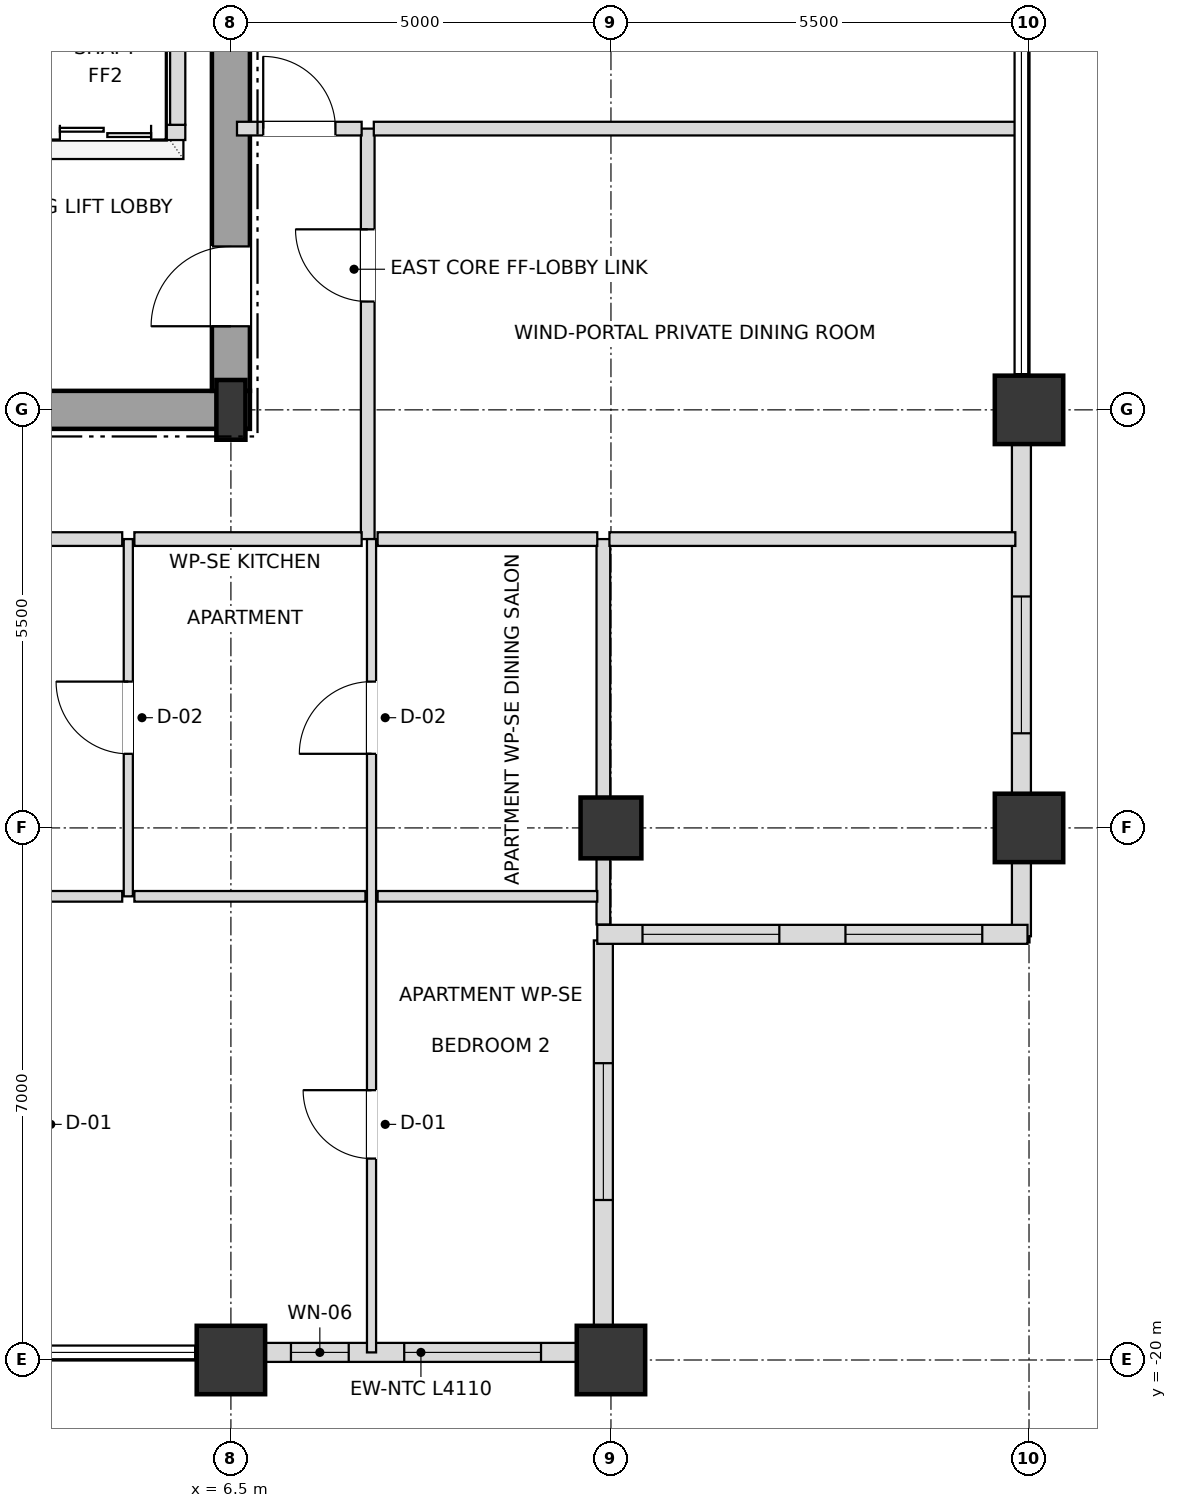
"""IFC4 building model, lengths in metres.
Left out: names, types, materials, properties, quantities, classifications, styles, units other than length and angle.
Written with IfcOpenShell. Run it as: python <this file> out.ifc"""

import sys

from ifc_helpers import new_model, si_unit, direction, frame, frame_2d, origin, origin_2d, place, context, subcontext, project, spatial, rectangle, i_section, extrude, element, fill, save


model = new_model("IFC4")
c1 = context("Model", 3, precision=1e-05, world=origin(), true_north=direction((0.0, 1.0)))
c2 = subcontext(c1, "Body", "Model", "MODEL_VIEW")
j1 = project(units=[si_unit("LENGTHUNIT", "METRE"), si_unit("PLANEANGLEUNIT", "RADIAN")], contexts=[c1])
p1 = place(None, origin())
s1 = spatial("IfcSite", under=j1, at=p1, CompositionType="ELEMENT")
p2 = place(p1, origin())
s2 = spatial("IfcBuilding", under=s1, at=p2, CompositionType="ELEMENT")
p3 = place(p2, frame((0.0, 0.0, 265.5)))
s3 = spatial("IfcBuildingStorey", under=s2, at=p3, CompositionType="ELEMENT", Elevation=265.5)
p4 = place(p3, frame((6.5, -7.5, 0.0), z_axis=(0.0, 0.0, 1.0), x_axis=(1.0, 0.0, 0.0)))
e1 = element("IfcColumn", 1, at=p4, inside=s3, PredefinedType="COLUMN", context=c2, shape_type="SweptSolid", body=[
    extrude(i_section(OverallWidth=0.382, OverallDepth=0.786, WebThickness=0.02, FlangeThickness=0.033, at=origin_2d()), origin(), (0.0, 0.0, 1.0), 3.6),
])
for number, where, z_axis, x_axis in (
    (2, (6.5, -20.0, 0.0), (0.0, 0.0, 1.0), (1.0, 0.0, 0.0)),
    (3, (11.5, -20.0, 0.0), (0.0, 0.0, 1.0), (1.0, 0.0, 0.0)),
    (4, (17.0, -13.0, 0.0), (0.0, 0.0, 1.0), (1.0, 0.0, 0.0)),
    (5, (17.0, -7.5, 0.0), (0.0, 0.0, 1.0), (1.0, 0.0, 0.0)),
):
    element("IfcColumn", number, at=place(p3, frame(where, z_axis=z_axis, x_axis=x_axis)), inside=s3, PredefinedType="USERDEFINED", context=c2, shape_type="SweptSolid", body=[
        extrude(rectangle(XDim=0.9, YDim=0.9, at=origin_2d()), origin(), (0.0, 0.0, 1.0), 3.6),
    ])
p5 = place(p3, frame((11.5, -13.0, 0.0), z_axis=(0.0, 0.0, 1.0), x_axis=(1.0, 0.0, 0.0)))
e6 = element("IfcColumn", 6, at=p5, inside=s3, PredefinedType="COLUMN", context=c2, shape_type="SweptSolid", body=[
    extrude(rectangle(XDim=0.8, YDim=0.8, at=origin_2d()), origin(), (0.0, 0.0, 1.0), 3.6),
])
p6 = place(p3, frame((6.945, -19.9, 0.0), z_axis=(0.0, 0.0, 1.0), x_axis=(1.0, 0.0, 0.0)))
e7 = element("IfcWall", 7, at=p6, inside=s3, PredefinedType="SOLIDWALL", context=c2, shape_type="SweptSolid", body=[
    extrude(rectangle(XDim=4.11, YDim=0.25, at=frame_2d((2.055, 0.0))), origin(), (0.0, 0.0, 1.0), 2.748),
])
p7 = place(p6, frame((0.345, 0.0, 0.72)))
e8 = element("IfcOpeningElement", 8, at=p7, cuts=e7, PredefinedType="OPENING", context=c2, shape_type="SweptSolid", body=[
    extrude(rectangle(XDim=0.76, YDim=1.68, at=frame_2d((0.38, 0.84))), frame((0.0, 0.135, 0.0), z_axis=(0.0, -1.0, 0.0), x_axis=(1.0, 0.0, 0.0)), (0.0, 0.0, 1.0), 0.27),
])
p8 = place(p6, frame((1.835, 0.0, 0.72)))
e9 = element("IfcOpeningElement", 9, at=p8, cuts=e7, PredefinedType="OPENING", context=c2, shape_type="SweptSolid", body=[
    extrude(rectangle(XDim=1.8, YDim=1.68, at=frame_2d((0.9, 0.84))), frame((0.0, 0.135, 0.0), z_axis=(0.0, -1.0, 0.0), x_axis=(1.0, 0.0, 0.0)), (0.0, 0.0, 1.0), 0.27),
])
p9 = place(p3, frame((16.9, -14.425, 0.0), z_axis=(0.0, 0.0, 1.0), x_axis=(0.0, 1.0, 0.0)))
e10 = element("IfcWall", 10, at=p9, inside=s3, PredefinedType="SOLIDWALL", context=c2, shape_type="SweptSolid", body=[
    extrude(rectangle(XDim=0.98, YDim=0.25, at=frame_2d((0.49, 0.0))), origin(), (0.0, 0.0, 1.0), 2.748),
])
p10 = place(p3, frame((16.9, -12.555, 0.0), z_axis=(0.0, 0.0, 1.0), x_axis=(0.0, 1.0, 0.0)))
e11 = element("IfcWall", 11, at=p10, inside=s3, PredefinedType="SOLIDWALL", context=c2, shape_type="SweptSolid", body=[
    extrude(rectangle(XDim=4.61, YDim=0.25, at=frame_2d((2.305, 0.0))), origin(), (0.0, 0.0, 1.0), 2.748),
])
p11 = place(p10, frame((0.8, 0.0, 0.72)))
e12 = element("IfcOpeningElement", 12, at=p11, cuts=e11, PredefinedType="OPENING", context=c2, shape_type="SweptSolid", body=[
    extrude(rectangle(XDim=1.8, YDim=1.68, at=frame_2d((0.9, 0.84))), frame((0.0, 0.135, 0.0), z_axis=(0.0, -1.0, 0.0), x_axis=(1.0, 0.0, 0.0)), (0.0, 0.0, 1.0), 0.27),
])
p12 = place(p3, frame((11.4, -19.82, 0.0), z_axis=(0.0, 0.0, 1.0), x_axis=(0.0, 1.0, 0.0)))
e13 = element("IfcWall", 13, at=p12, inside=s3, PredefinedType="SOLIDWALL", context=c2, shape_type="SweptSolid", body=[
    extrude(rectangle(XDim=5.34, YDim=0.25, at=frame_2d((2.67, 0.0))), origin(), (0.0, 0.0, 1.0), 2.748),
])
p13 = place(p12, frame((1.925, 0.0, 0.72)))
e14 = element("IfcOpeningElement", 14, at=p13, cuts=e13, PredefinedType="OPENING", context=c2, shape_type="SweptSolid", body=[
    extrude(rectangle(XDim=1.8, YDim=1.68, at=frame_2d((0.9, 0.84))), frame((0.0, 0.135, 0.0), z_axis=(0.0, -1.0, 0.0), x_axis=(1.0, 0.0, 0.0)), (0.0, 0.0, 1.0), 0.27),
])
p14 = place(p3, frame((11.32, -14.4, 0.0), z_axis=(0.0, 0.0, 1.0), x_axis=(1.0, 0.0, 0.0)))
e15 = element("IfcWall", 15, at=p14, inside=s3, PredefinedType="SOLIDWALL", context=c2, shape_type="SweptSolid", body=[
    extrude(rectangle(XDim=5.66, YDim=0.25, at=frame_2d((2.83, 0.0))), origin(), (0.0, 0.0, 1.0), 2.748),
])
p15 = place(p14, frame((0.595, 0.0, 0.72)))
e16 = element("IfcOpeningElement", 16, at=p15, cuts=e15, PredefinedType="OPENING", context=c2, shape_type="SweptSolid", body=[
    extrude(rectangle(XDim=1.8, YDim=1.68, at=frame_2d((0.9, 0.84))), frame((0.0, 0.135, 0.0), z_axis=(0.0, -1.0, 0.0), x_axis=(1.0, 0.0, 0.0)), (0.0, 0.0, 1.0), 0.27),
])
p16 = place(p14, frame((3.265, 0.0, 0.72)))
e17 = element("IfcOpeningElement", 17, at=p16, cuts=e15, PredefinedType="OPENING", context=c2, shape_type="SweptSolid", body=[
    extrude(rectangle(XDim=1.8, YDim=1.68, at=frame_2d((0.9, 0.84))), frame((0.0, 0.135, 0.0), z_axis=(0.0, -1.0, 0.0), x_axis=(1.0, 0.0, 0.0)), (0.0, 0.0, 1.0), 0.27),
])
p17 = place(p3, frame((0.0, -7.5, 0.0), z_axis=(0.0, 0.0, 1.0), x_axis=(1.0, 0.0, 0.0)))
e18 = element("IfcWall", 18, at=p17, inside=s3, PredefinedType="SHEAR", context=c2, shape_type="SweptSolid", body=[
    extrude(rectangle(XDim=6.75, YDim=0.5, at=frame_2d((3.375, 0.0))), origin(), (0.0, 0.0, 1.0), 3.38),
])
p18 = place(p3, frame((6.5, -7.25, 0.0), z_axis=(0.0, 0.0, 1.0), x_axis=(0.0, 1.0, 0.0)))
e19 = element("IfcWall", 19, at=p18, inside=s3, PredefinedType="SHEAR", context=c2, shape_type="SweptSolid", body=[
    extrude(rectangle(XDim=5.75, YDim=0.5, at=frame_2d((2.875, 0.0))), origin(), (0.0, 0.0, 1.0), 3.38),
])
p19 = place(p18, frame((0.85, 0.0, 0.0)))
e20 = element("IfcOpeningElement", 20, at=p19, cuts=e19, PredefinedType="OPENING", context=c2, shape_type="SweptSolid", body=[
    extrude(rectangle(XDim=1.05, YDim=2.15, at=frame_2d((0.525, 1.075))), frame((0.0, 0.26, 0.0), z_axis=(0.0, -1.0, 0.0), x_axis=(1.0, 0.0, 0.0)), (0.0, 0.0, 1.0), 0.52),
])
p20 = place(p3, frame((1.8, -3.85, 0.0), z_axis=(0.0, 0.0, 1.0), x_axis=(1.0, 0.0, 0.0)))
e21 = element("IfcWall", 21, at=p20, inside=s3, PredefinedType="SOLIDWALL", context=c2, shape_type="SweptSolid", body=[
    extrude(rectangle(XDim=4.1, YDim=0.2, at=frame_2d((2.05, 0.0))), origin(), (0.0, 0.0, 1.0), 3.38),
])
p21 = place(p20, frame((0.45, 0.0, 0.0)))
e22 = element("IfcOpeningElement", 22, at=p21, cuts=e21, PredefinedType="OPENING", context=c2, shape_type="SweptSolid", body=[
    extrude(rectangle(XDim=1.2, YDim=2.2, at=frame_2d((0.6, 1.1))), frame((0.0, 0.11, 0.0), z_axis=(0.0, -1.0, 0.0), x_axis=(1.0, 0.0, 0.0)), (0.0, 0.0, 1.0), 0.22),
])
p22 = place(p20, frame((2.45, 0.0, 0.0)))
e23 = element("IfcOpeningElement", 23, at=p22, cuts=e21, PredefinedType="OPENING", context=c2, shape_type="SweptSolid", body=[
    extrude(rectangle(XDim=1.2, YDim=2.2, at=frame_2d((0.6, 1.1))), frame((0.0, 0.11, 0.0), z_axis=(0.0, -1.0, 0.0), x_axis=(1.0, 0.0, 0.0)), (0.0, 0.0, 1.0), 0.22),
])
p23 = place(p3, frame((5.8, -3.75, 0.0), z_axis=(0.0, 0.0, 1.0), x_axis=(0.0, 1.0, 0.0)))
e24 = element("IfcWall", 24, at=p23, inside=s3, PredefinedType="SOLIDWALL", context=c2, shape_type="SweptSolid", body=[
    extrude(rectangle(XDim=2.0, YDim=0.2, at=frame_2d((1.0, 0.0))), origin(), (0.0, 0.0, 1.0), 3.38),
])
p24 = place(p3, frame((5.15, -13.9, 0.0), z_axis=(0.0, 0.0, 1.0), x_axis=(0.0, 1.0, 0.0)))
e25 = element("IfcWall", 25, at=p24, inside=s3, PredefinedType="PARTITIONING", context=c2, shape_type="SweptSolid", body=[
    extrude(rectangle(XDim=4.7, YDim=0.12, at=frame_2d((2.35, 0.0))), origin(), (0.0, 0.0, 1.0), 3.38),
])
p25 = place(p24, frame((1.875, 0.0, 0.0)))
e26 = element("IfcOpeningElement", 26, at=p25, cuts=e25, PredefinedType="OPENING", context=c2, shape_type="SweptSolid", body=[
    extrude(rectangle(XDim=0.95, YDim=2.1, at=frame_2d((0.475, 1.05))), frame((0.0, 0.07, 0.0), z_axis=(0.0, -1.0, 0.0), x_axis=(1.0, 0.0, 0.0)), (0.0, 0.0, 1.0), 0.14),
])
p26 = place(p3, frame((8.3, -9.2, 0.0), z_axis=(0.0, 0.0, 1.0), x_axis=(0.0, 1.0, 0.0)))
e27 = element("IfcWall", 27, at=p26, inside=s3, PredefinedType="PARTITIONING", context=c2, shape_type="SweptSolid", body=[
    extrude(rectangle(XDim=5.4, YDim=0.18, at=frame_2d((2.7, 0.0))), origin(), (0.0, 0.0, 1.0), 2.826),
])
p27 = place(p26, frame((3.125, 0.0, 0.0)))
e28 = element("IfcOpeningElement", 28, at=p27, cuts=e27, PredefinedType="OPENING", context=c2, shape_type="SweptSolid", body=[
    extrude(rectangle(XDim=0.95, YDim=2.15, at=frame_2d((0.475, 1.075))), frame((0.0, 0.1, 0.0), z_axis=(0.0, -1.0, 0.0), x_axis=(1.0, 0.0, 0.0)), (0.0, 0.0, 1.0), 0.2),
])
p28 = place(p3, frame((8.35, -19.9, 0.0), z_axis=(0.0, 0.0, 1.0), x_axis=(0.0, 1.0, 0.0)))
e29 = element("IfcWall", 29, at=p28, inside=s3, PredefinedType="PARTITIONING", context=c2, shape_type="SweptSolid", body=[
    extrude(rectangle(XDim=10.7, YDim=0.12, at=frame_2d((5.35, 0.0))), origin(), (0.0, 0.0, 1.0), 2.826),
])
p29 = place(p28, frame((7.875, 0.0, 0.0)))
e30 = element("IfcOpeningElement", 30, at=p29, cuts=e29, PredefinedType="OPENING", context=c2, shape_type="SweptSolid", body=[
    extrude(rectangle(XDim=0.95, YDim=2.1, at=frame_2d((0.475, 1.05))), frame((0.0, 0.07, 0.0), z_axis=(0.0, -1.0, 0.0), x_axis=(1.0, 0.0, 0.0)), (0.0, 0.0, 1.0), 0.14),
])
p30 = place(p28, frame((2.55, 0.0, 0.0)))
e31 = element("IfcOpeningElement", 31, at=p30, cuts=e29, PredefinedType="OPENING", context=c2, shape_type="SweptSolid", body=[
    extrude(rectangle(XDim=0.9, YDim=2.1, at=frame_2d((0.45, 1.05))), frame((0.0, 0.07, 0.0), z_axis=(0.0, -1.0, 0.0), x_axis=(1.0, 0.0, 0.0)), (0.0, 0.0, 1.0), 0.14),
])
p31 = place(p3, frame((11.4, -14.27, 0.0), z_axis=(0.0, 0.0, 1.0), x_axis=(0.0, 1.0, 0.0)))
e32 = element("IfcWall", 32, at=p31, inside=s3, PredefinedType="PARTITIONING", context=c2, shape_type="SweptSolid", body=[
    extrude(rectangle(XDim=5.07, YDim=0.18, at=frame_2d((2.535, 0.0))), origin(), (0.0, 0.0, 1.0), 2.748),
])
p32 = place(p3, frame((4.03, -13.9, 0.0), z_axis=(0.0, 0.0, 1.0), x_axis=(1.0, 0.0, 0.0)))
e33 = element("IfcWall", 33, at=p32, inside=s3, PredefinedType="PARTITIONING", context=c2, shape_type="SweptSolid", body=[
    extrude(rectangle(XDim=1.04, YDim=0.14, at=frame_2d((0.52, 0.0))), origin(), (0.0, 0.0, 1.0), 3.38),
])
p33 = place(p3, frame((5.23, -13.9, 0.0), z_axis=(0.0, 0.0, 1.0), x_axis=(1.0, 0.0, 0.0)))
e34 = element("IfcWall", 34, at=p33, inside=s3, PredefinedType="PARTITIONING", context=c2, shape_type="SweptSolid", body=[
    extrude(rectangle(XDim=3.04, YDim=0.14, at=frame_2d((1.52, 0.0))), origin(), (0.0, 0.0, 1.0), 2.826),
])
p34 = place(p3, frame((8.43, -13.9, 0.0), z_axis=(0.0, 0.0, 1.0), x_axis=(1.0, 0.0, 0.0)))
e35 = element("IfcWall", 35, at=p34, inside=s3, PredefinedType="PARTITIONING", context=c2, shape_type="SweptSolid", body=[
    extrude(rectangle(XDim=2.89, YDim=0.14, at=frame_2d((1.445, 0.0))), origin(), (0.0, 0.0, 1.0), 3.38),
])
p35 = place(p3, frame((1.03, -9.2, 0.0), z_axis=(0.0, 0.0, 1.0), x_axis=(1.0, 0.0, 0.0)))
e36 = element("IfcWall", 36, at=p35, inside=s3, PredefinedType="PARTITIONING", context=c2, shape_type="SweptSolid", body=[
    extrude(rectangle(XDim=4.04, YDim=0.18, at=frame_2d((2.02, 0.0))), origin(), (0.0, 0.0, 1.0), 3.38),
])
p36 = place(p35, frame((1.545, 0.0, 0.0)))
e37 = element("IfcOpeningElement", 37, at=p36, cuts=e36, PredefinedType="OPENING", context=c2, shape_type="SweptSolid", body=[
    extrude(rectangle(XDim=0.95, YDim=2.15, at=frame_2d((0.475, 1.075))), frame((0.0, 0.1, 0.0), z_axis=(0.0, -1.0, 0.0), x_axis=(1.0, 0.0, 0.0)), (0.0, 0.0, 1.0), 0.2),
])
p37 = place(p3, frame((5.23, -9.2, 0.0), z_axis=(0.0, 0.0, 1.0), x_axis=(1.0, 0.0, 0.0)))
e38 = element("IfcWall", 38, at=p37, inside=s3, PredefinedType="PARTITIONING", context=c2, shape_type="SweptSolid", body=[
    extrude(rectangle(XDim=2.99, YDim=0.18, at=frame_2d((1.495, 0.0))), origin(), (0.0, 0.0, 1.0), 2.826),
])
p38 = place(p3, frame((8.43, -9.2, 0.0), z_axis=(0.0, 0.0, 1.0), x_axis=(1.0, 0.0, 0.0)))
e39 = element("IfcWall", 39, at=p38, inside=s3, PredefinedType="PARTITIONING", context=c2, shape_type="SweptSolid", body=[
    extrude(rectangle(XDim=2.89, YDim=0.18, at=frame_2d((1.445, 0.0))), origin(), (0.0, 0.0, 1.0), 3.38),
])
p39 = place(p3, frame((11.48, -9.2, 0.0), z_axis=(0.0, 0.0, 1.0), x_axis=(1.0, 0.0, 0.0)))
e40 = element("IfcWall", 40, at=p39, inside=s3, PredefinedType="PARTITIONING", context=c2, shape_type="SweptSolid", body=[
    extrude(rectangle(XDim=5.34, YDim=0.18, at=frame_2d((2.67, 0.0))), origin(), (0.0, 0.0, 1.0), 3.38),
])
p40 = place(p3, frame((6.58, -3.8, 0.0), z_axis=(0.0, 0.0, 1.0), x_axis=(1.0, 0.0, 0.0)))
e41 = element("IfcWall", 41, at=p40, inside=s3, PredefinedType="PARTITIONING", context=c2, shape_type="SweptSolid", body=[
    extrude(rectangle(XDim=1.64, YDim=0.18, at=frame_2d((0.82, 0.0))), origin(), (0.0, 0.0, 1.0), 3.38),
])
p41 = place(p40, frame((0.345, 0.0, 0.0)))
e42 = element("IfcOpeningElement", 42, at=p41, cuts=e41, PredefinedType="OPENING", context=c2, shape_type="SweptSolid", body=[
    extrude(rectangle(XDim=0.95, YDim=2.15, at=frame_2d((0.475, 1.075))), frame((0.0, 0.1, 0.0), z_axis=(0.0, -1.0, 0.0), x_axis=(1.0, 0.0, 0.0)), (0.0, 0.0, 1.0), 0.2),
])
p42 = place(p3, frame((8.38, -3.8, 0.0), z_axis=(0.0, 0.0, 1.0), x_axis=(1.0, 0.0, 0.0)))
e43 = element("IfcWall", 43, at=p42, inside=s3, PredefinedType="PARTITIONING", context=c2, shape_type="SweptSolid", body=[
    extrude(rectangle(XDim=8.44, YDim=0.18, at=frame_2d((4.22, 0.0))), origin(), (0.0, 0.0, 1.0), 3.018),
])
p43 = place(p7, origin())
e44 = element("IfcWindow", 44, at=p43, inside=s3, PartitioningType="SINGLE_PANEL", PredefinedType="WINDOW", context=c2, shape_type="SweptSolid", body=[
    extrude(rectangle(XDim=0.76, YDim=1.68, at=frame_2d((0.38, 0.84))), frame((0.0, 0.03, 0.0), z_axis=(0.0, -1.0, 0.0), x_axis=(1.0, 0.0, 0.0)), (0.0, 0.0, 1.0), 0.06),
])
fill(e8, e44)
p44 = place(p8, origin())
e45 = element("IfcWindow", 45, at=p44, inside=s3, PartitioningType="SINGLE_PANEL", PredefinedType="WINDOW", context=c2, shape_type="SweptSolid", body=[
    extrude(rectangle(XDim=1.8, YDim=1.68, at=frame_2d((0.9, 0.84))), frame((0.0, 0.03, 0.0), z_axis=(0.0, -1.0, 0.0), x_axis=(1.0, 0.0, 0.0)), (0.0, 0.0, 1.0), 0.06),
])
fill(e9, e45)
p45 = place(p11, origin())
e46 = element("IfcWindow", 46, at=p45, inside=s3, PartitioningType="SINGLE_PANEL", PredefinedType="WINDOW", context=c2, shape_type="SweptSolid", body=[
    extrude(rectangle(XDim=1.8, YDim=1.68, at=frame_2d((0.9, 0.84))), frame((0.0, 0.03, 0.0), z_axis=(0.0, -1.0, 0.0), x_axis=(1.0, 0.0, 0.0)), (0.0, 0.0, 1.0), 0.06),
])
fill(e12, e46)
p46 = place(p13, origin())
e47 = element("IfcWindow", 47, at=p46, inside=s3, PartitioningType="SINGLE_PANEL", PredefinedType="WINDOW", context=c2, shape_type="SweptSolid", body=[
    extrude(rectangle(XDim=1.8, YDim=1.68, at=frame_2d((0.9, 0.84))), frame((0.0, 0.03, 0.0), z_axis=(0.0, -1.0, 0.0), x_axis=(1.0, 0.0, 0.0)), (0.0, 0.0, 1.0), 0.06),
])
fill(e14, e47)
p47 = place(p15, origin())
e48 = element("IfcWindow", 48, at=p47, inside=s3, PartitioningType="SINGLE_PANEL", PredefinedType="WINDOW", context=c2, shape_type="SweptSolid", body=[
    extrude(rectangle(XDim=1.8, YDim=1.68, at=frame_2d((0.9, 0.84))), frame((0.0, 0.03, 0.0), z_axis=(0.0, -1.0, 0.0), x_axis=(1.0, 0.0, 0.0)), (0.0, 0.0, 1.0), 0.06),
])
fill(e16, e48)
p48 = place(p16, origin())
e49 = element("IfcWindow", 49, at=p48, inside=s3, PartitioningType="SINGLE_PANEL", PredefinedType="WINDOW", context=c2, shape_type="SweptSolid", body=[
    extrude(rectangle(XDim=1.8, YDim=1.68, at=frame_2d((0.9, 0.84))), frame((0.0, 0.03, 0.0), z_axis=(0.0, -1.0, 0.0), x_axis=(1.0, 0.0, 0.0)), (0.0, 0.0, 1.0), 0.06),
])
fill(e17, e49)
p49 = place(p19, origin())
e50 = element("IfcDoor", 50, at=p49, inside=s3, OperationType="SINGLE_SWING_LEFT", PredefinedType="DOOR", context=c2, shape_type="SweptSolid", body=[
    extrude(rectangle(XDim=1.05, YDim=2.15, at=frame_2d((0.525, 1.075))), frame((0.0, 0.025, 0.0), z_axis=(0.0, -1.0, 0.0), x_axis=(1.0, 0.0, 0.0)), (0.0, 0.0, 1.0), 0.05),
])
fill(e20, e50)
p50 = place(p22, origin())
e51 = element("IfcDoor", 51, at=p50, inside=s3, OperationType="DOUBLE_DOOR_SLIDING", PredefinedType="DOOR", context=c2, shape_type="SweptSolid", body=[
    extrude(rectangle(XDim=1.2, YDim=2.2, at=frame_2d((0.6, 1.1))), frame((0.0, 0.025, 0.0), z_axis=(0.0, -1.0, 0.0), x_axis=(1.0, 0.0, 0.0)), (0.0, 0.0, 1.0), 0.05),
])
fill(e23, e51)
p51 = place(p25, origin())
e52 = element("IfcDoor", 52, at=p51, inside=s3, OperationType="SINGLE_SWING_RIGHT", PredefinedType="DOOR", context=c2, shape_type="SweptSolid", body=[
    extrude(rectangle(XDim=0.95, YDim=2.1, at=frame_2d((0.475, 1.05))), frame((0.0, 0.025, 0.0), z_axis=(0.0, -1.0, 0.0), x_axis=(1.0, 0.0, 0.0)), (0.0, 0.0, 1.0), 0.05),
])
fill(e26, e52)
p52 = place(p29, origin())
e53 = element("IfcDoor", 53, at=p52, inside=s3, OperationType="SINGLE_SWING_LEFT", PredefinedType="DOOR", context=c2, shape_type="SweptSolid", body=[
    extrude(rectangle(XDim=0.95, YDim=2.1, at=frame_2d((0.475, 1.05))), frame((0.0, 0.025, 0.0), z_axis=(0.0, -1.0, 0.0), x_axis=(1.0, 0.0, 0.0)), (0.0, 0.0, 1.0), 0.05),
])
fill(e30, e53)
p53 = place(p30, origin())
e54 = element("IfcDoor", 54, at=p53, inside=s3, OperationType="SINGLE_SWING_RIGHT", PredefinedType="DOOR", context=c2, shape_type="SweptSolid", body=[
    extrude(rectangle(XDim=0.9, YDim=2.1, at=frame_2d((0.45, 1.05))), frame((0.0, 0.025, 0.0), z_axis=(0.0, -1.0, 0.0), x_axis=(1.0, 0.0, 0.0)), (0.0, 0.0, 1.0), 0.05),
])
fill(e31, e54)
p54 = place(p27, origin())
e55 = element("IfcDoor", 55, at=p54, inside=s3, OperationType="SINGLE_SWING_RIGHT", PredefinedType="DOOR", context=c2, shape_type="SweptSolid", body=[
    extrude(rectangle(XDim=0.95, YDim=2.15, at=frame_2d((0.475, 1.075))), frame((0.0, 0.025, 0.0), z_axis=(0.0, -1.0, 0.0), x_axis=(1.0, 0.0, 0.0)), (0.0, 0.0, 1.0), 0.05),
])
fill(e28, e55)
p55 = place(p41, origin())
e56 = element("IfcDoor", 56, at=p55, inside=s3, OperationType="SINGLE_SWING_LEFT", PredefinedType="DOOR", context=c2, shape_type="SweptSolid", body=[
    extrude(rectangle(XDim=0.95, YDim=2.15, at=frame_2d((0.475, 1.075))), frame((0.0, 0.025, 0.0), z_axis=(0.0, -1.0, 0.0), x_axis=(1.0, 0.0, 0.0)), (0.0, 0.0, 1.0), 0.05),
])
fill(e42, e56)
save(model, sys.argv[1])
